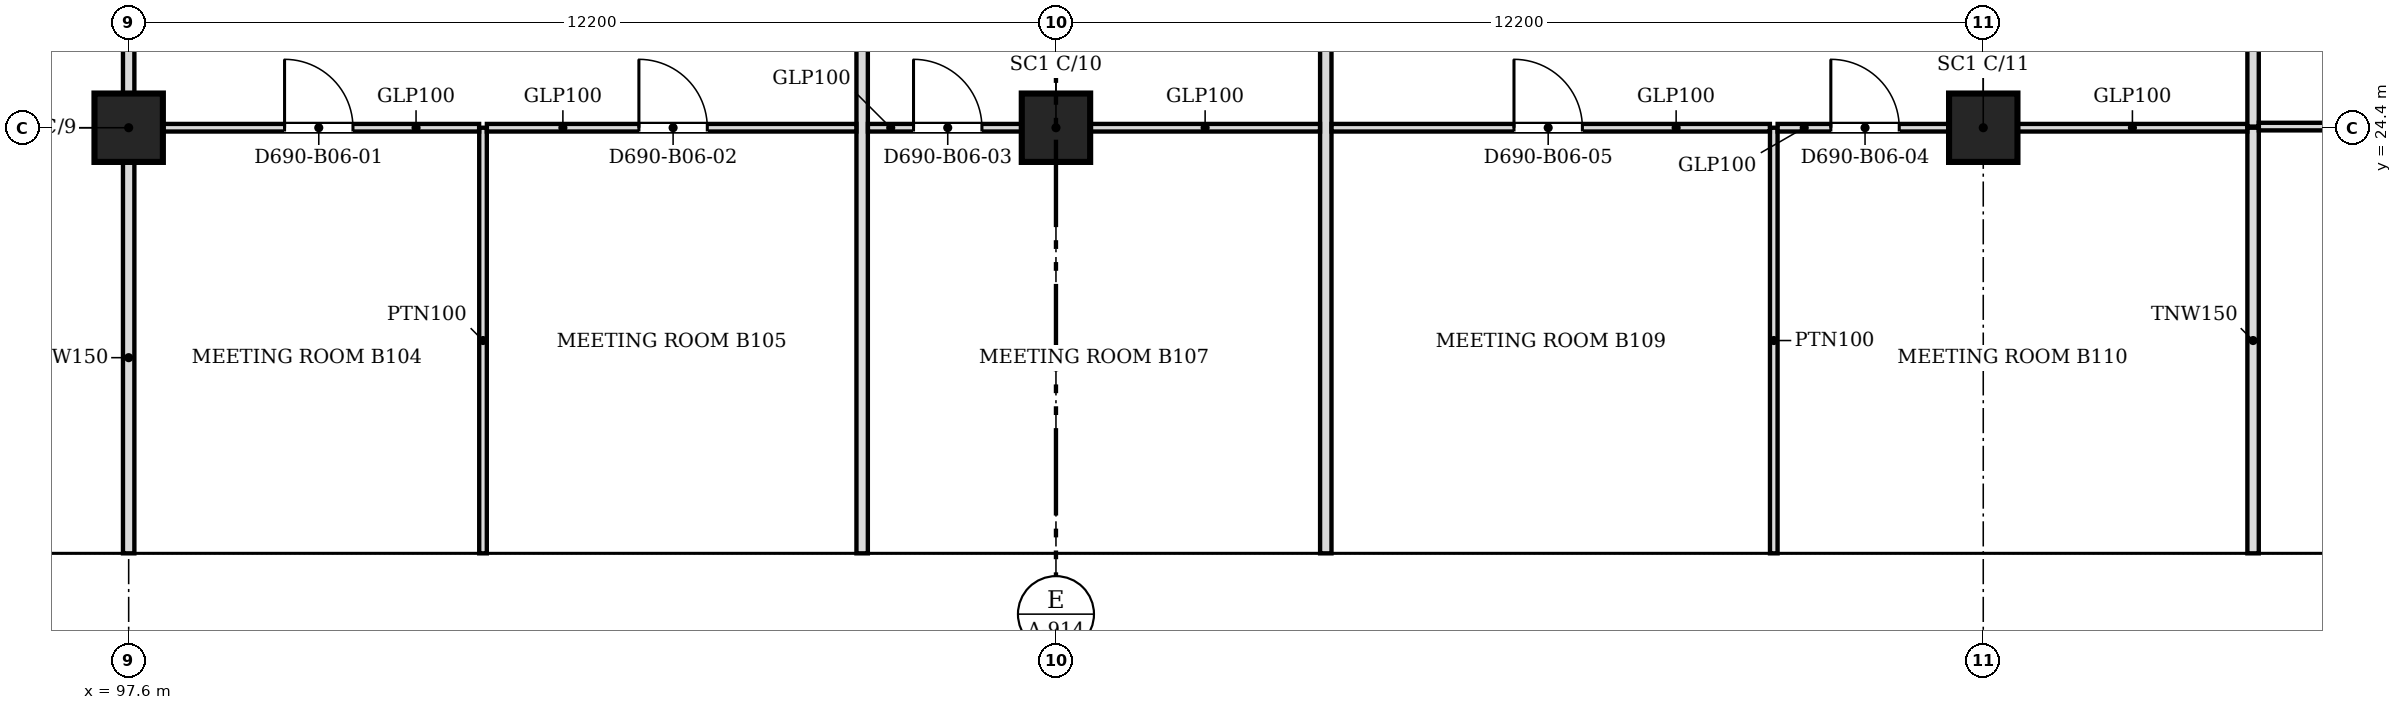
"""IFC4 building model, lengths in metres.
Left out: names, types, materials, properties, quantities, classifications, styles, units other than length and angle.
Written with IfcOpenShell. Run it as: python <this file> out.ifc"""

import sys

from ifc_helpers import new_model, si_unit, direction, frame, frame_2d, origin, origin_2d, place, context, subcontext, project, spatial, polyline, rectangle, outline, extrude, faceted_brep, source, transform, mapped, element, fill, save


model = new_model("IFC4")
c1 = context("Model", 3, precision=1e-05, world=origin(), true_north=direction((0.0, 1.0)))
c2 = subcontext(c1, "Body", "Model", "MODEL_VIEW")
j1 = project(units=[si_unit("LENGTHUNIT", "METRE"), si_unit("PLANEANGLEUNIT", "RADIAN")], contexts=[c1])
p1 = place(None, origin())
s1 = spatial("IfcSite", under=j1, at=p1, CompositionType="ELEMENT")
p2 = place(p1, origin())
s2 = spatial("IfcBuilding", under=s1, at=p2, CompositionType="ELEMENT")
p3 = place(p2, frame((0.0, 0.0, 60.0)))
s3 = spatial("IfcBuildingStorey", under=s2, at=p3, CompositionType="ELEMENT", Elevation=60.0)
for number, where, z_axis, x_axis in (
    (1, (97.6, 24.4, 0.0), (0.0, 0.0, 1.0), (1.0, 0.0, 0.0)),
    (2, (109.8, 24.4, 0.0), (0.0, 0.0, 1.0), (1.0, 0.0, 0.0)),
    (3, (122.0, 24.4, 0.0), (0.0, 0.0, 1.0), (1.0, 0.0, 0.0)),
):
    element("IfcColumn", number, at=place(p3, frame(where, z_axis=z_axis, x_axis=x_axis)), inside=s3, PredefinedType="COLUMN", context=c2, shape_type="SweptSolid", body=[
        extrude(rectangle(XDim=0.9, YDim=0.9, at=origin_2d()), origin(), (0.0, 0.0, 1.0), 3.5),
    ])
m1 = source(origin(), c2, "Body", "Brep", [
    faceted_brep([(3.003, -0.25, 0.0), (6.053, -0.25, 3.8), (3.003, -0.25, 7.6), (0.0, -0.25, 3.8), (0.047, 0.25, 3.859), (3.003, 0.25, 7.6), (6.053, 0.25, 3.8), (3.003, 0.25, 0.0), (0.047, 0.25, 3.741), (0.0, 0.0, 3.8)], [[[0, 1, 2, 3]], [[4, 5, 6, 7, 8]], [[7, 6, 1, 0]], [[6, 5, 2, 1]], [[5, 4, 9, 3, 2]], [[8, 7, 0, 3, 9]], [[8, 9, 4]]]),
])
p4 = place(p3, frame((91.547, 18.55, -3.8), z_axis=(0.0, 0.0, 1.0), x_axis=(1.0, 0.0, 0.0)))
e4 = element("IfcWall", 4, at=p4, inside=s3, PredefinedType="SOLIDWALL", context=c2, shape_type="MappedRepresentation", body=[
    mapped(m1, transform((0.0, 0.0, 0.0), scale=1.0)),
])
m2 = source(origin(), c2, "Body", "SweptSolid", [
    extrude(outline(polyline([(3.005, 0.401), (5.733, 3.8), (3.005, 7.199), (0.319, 3.8), (3.005, 0.401)])), frame((0.0, 0.26, 0.0), z_axis=(0.0, -1.0, 0.0), x_axis=(1.0, 0.0, 0.0)), (0.0, 0.0, 1.0), 0.52),
])
p5 = place(p4, origin())
e5 = element("IfcOpeningElement", 5, at=p5, cuts=e4, PredefinedType="OPENING", context=c2, shape_type="MappedRepresentation", body=[
    mapped(m2, transform((0.0, 0.0, 0.0), scale=1.0)),
])
m3 = source(origin(), c2, "Body", "Brep", [
    faceted_brep([(3.05, -0.25, 0.0), (6.1, -0.25, 3.8), (6.1, -0.25, 3.8), (3.05, -0.25, 7.6), (0.0, -0.25, 3.8), (0.0, 0.25, 3.8), (3.05, 0.25, 7.6), (6.1, 0.25, 3.8), (6.1, 0.25, 3.8), (3.05, 0.25, 0.0)], [[[0, 1, 2, 3, 4]], [[5, 6, 7, 8, 9]], [[9, 8, 1, 0]], [[7, 6, 3, 2]], [[6, 5, 4, 3]], [[5, 9, 0, 4]], [[1, 8, 7, 2]]]),
])
p6 = place(p3, frame((97.6, 18.55, -3.8), z_axis=(0.0, 0.0, 1.0), x_axis=(1.0, 0.0, 0.0)))
e6 = element("IfcWall", 6, at=p6, inside=s3, PredefinedType="SOLIDWALL", context=c2, shape_type="MappedRepresentation", body=[
    mapped(m3, transform((0.0, 0.0, 0.0), scale=1.0)),
])
m4 = source(origin(), c2, "Body", "SweptSolid", [
    extrude(outline(polyline([(3.05, 0.399), (5.78, 3.8), (3.05, 7.201), (0.321, 3.8), (3.05, 0.399)])), frame((0.0, 0.26, 0.0), z_axis=(0.0, -1.0, 0.0), x_axis=(1.0, 0.0, 0.0)), (0.0, 0.0, 1.0), 0.52),
])
p7 = place(p6, origin())
e7 = element("IfcOpeningElement", 7, at=p7, cuts=e6, PredefinedType="OPENING", context=c2, shape_type="MappedRepresentation", body=[
    mapped(m4, transform((0.0, 0.0, 0.0), scale=1.0)),
])
m5 = source(origin(), c2, "Body", "SweptSolid", [
    extrude(outline(polyline([(3.05, 0.0), (6.1, 3.8), (3.05, 7.6), (0.0, 3.8), (3.05, 0.0)])), frame((0.0, 0.25, 0.0), z_axis=(0.0, -1.0, 0.0), x_axis=(1.0, 0.0, 0.0)), (0.0, 0.0, 1.0), 0.5),
])
p8 = place(p3, frame((103.7, 18.55, -3.8), z_axis=(0.0, 0.0, 1.0), x_axis=(1.0, 0.0, 0.0)))
e8 = element("IfcWall", 8, at=p8, inside=s3, PredefinedType="SOLIDWALL", context=c2, shape_type="MappedRepresentation", body=[
    mapped(m5, transform((0.0, 0.0, 0.0), scale=1.0)),
])
p9 = place(p8, origin())
e9 = element("IfcOpeningElement", 9, at=p9, cuts=e8, PredefinedType="OPENING", context=c2, shape_type="MappedRepresentation", body=[
    mapped(m4, transform((0.0, 0.0, 0.0), scale=1.0)),
])
p10 = place(p3, frame((109.8, 18.55, -3.8), z_axis=(0.0, 0.0, 1.0), x_axis=(1.0, 0.0, 0.0)))
e10 = element("IfcWall", 10, at=p10, inside=s3, PredefinedType="SOLIDWALL", context=c2, shape_type="MappedRepresentation", body=[
    mapped(m3, transform((0.0, 0.0, 0.0), scale=1.0)),
])
p11 = place(p10, origin())
e11 = element("IfcOpeningElement", 11, at=p11, cuts=e10, PredefinedType="OPENING", context=c2, shape_type="MappedRepresentation", body=[
    mapped(m4, transform((0.0, 0.0, 0.0), scale=1.0)),
])
p12 = place(p3, frame((115.9, 18.55, -3.8), z_axis=(0.0, 0.0, 1.0), x_axis=(1.0, 0.0, 0.0)))
e12 = element("IfcWall", 12, at=p12, inside=s3, PredefinedType="SOLIDWALL", context=c2, shape_type="MappedRepresentation", body=[
    mapped(m5, transform((0.0, 0.0, 0.0), scale=1.0)),
])
p13 = place(p12, origin())
e13 = element("IfcOpeningElement", 13, at=p13, cuts=e12, PredefinedType="OPENING", context=c2, shape_type="MappedRepresentation", body=[
    mapped(m4, transform((0.0, 0.0, 0.0), scale=1.0)),
])
m6 = source(origin(), c2, "Body", "Brep", [
    faceted_brep([(3.05, -0.25, 0.0), (6.053, -0.25, 3.8), (3.05, -0.25, 7.6), (0.0, -0.25, 3.8), (0.0, 0.25, 3.8), (3.05, 0.25, 7.6), (6.007, 0.25, 3.859), (6.007, 0.25, 3.741), (3.05, 0.25, 0.0), (6.053, 0.0, 3.8)], [[[0, 1, 2, 3]], [[4, 5, 6, 7, 8]], [[8, 7, 9, 1, 0]], [[6, 5, 2, 1, 9]], [[5, 4, 3, 2]], [[4, 8, 0, 3]], [[9, 7, 6]]]),
])
p14 = place(p3, frame((122.0, 18.55, -3.8), z_axis=(0.0, 0.0, 1.0), x_axis=(1.0, 0.0, 0.0)))
e14 = element("IfcWall", 14, at=p14, inside=s3, PredefinedType="SOLIDWALL", context=c2, shape_type="MappedRepresentation", body=[
    mapped(m6, transform((0.0, 0.0, 0.0), scale=1.0)),
])
m7 = source(origin(), c2, "Body", "SweptSolid", [
    extrude(outline(polyline([(3.049, 0.401), (5.735, 3.8), (3.049, 7.199), (0.321, 3.8), (3.049, 0.401)])), frame((0.0, 0.26, 0.0), z_axis=(0.0, -1.0, 0.0), x_axis=(1.0, 0.0, 0.0)), (0.0, 0.0, 1.0), 0.52),
])
p15 = place(p14, origin())
e15 = element("IfcOpeningElement", 15, at=p15, cuts=e14, PredefinedType="OPENING", context=c2, shape_type="MappedRepresentation", body=[
    mapped(m7, transform((0.0, 0.0, 0.0), scale=1.0)),
])
m8 = source(origin(), c2, "Body", "Brep", [
    faceted_brep([(3.05, -0.25, 0.0), (6.1, -0.25, 3.8), (6.1, -0.25, 3.8), (0.0, -0.25, 3.8), (0.0, 0.25, 3.8), (6.1, 0.25, 3.8), (6.1, 0.25, 3.8), (3.05, 0.25, 0.0)], [[[0, 1, 2, 3]], [[4, 5, 6, 7]], [[7, 6, 1, 0]], [[5, 4, 3, 2]], [[4, 7, 0, 3]], [[1, 6, 5, 2]]]),
])
p16 = place(p3, frame((94.55, 18.55, 0.0), z_axis=(0.0, 0.0, 1.0), x_axis=(1.0, 0.0, 0.0)))
e16 = element("IfcWall", 16, at=p16, inside=s3, PredefinedType="SOLIDWALL", context=c2, shape_type="MappedRepresentation", body=[
    mapped(m8, transform((0.0, 0.0, 0.0), scale=1.0)),
])
m9 = source(origin(), c2, "Body", "SweptSolid", [
    extrude(outline(polyline([(3.05, 0.399), (5.579, 3.55), (0.521, 3.55), (3.05, 0.399)])), frame((0.0, 0.26, 0.0), z_axis=(0.0, -1.0, 0.0), x_axis=(1.0, 0.0, 0.0)), (0.0, 0.0, 1.0), 0.52),
])
p17 = place(p16, origin())
e17 = element("IfcOpeningElement", 17, at=p17, cuts=e16, PredefinedType="OPENING", context=c2, shape_type="MappedRepresentation", body=[
    mapped(m9, transform((0.0, 0.0, 0.0), scale=1.0)),
])
m10 = source(origin(), c2, "Body", "SweptSolid", [
    extrude(outline(polyline([(3.05, 0.0), (6.1, 3.8), (0.0, 3.8), (3.05, 0.0)])), frame((0.0, 0.25, 0.0), z_axis=(0.0, -1.0, 0.0), x_axis=(1.0, 0.0, 0.0)), (0.0, 0.0, 1.0), 0.5),
])
p18 = place(p3, frame((100.65, 18.55, 0.0), z_axis=(0.0, 0.0, 1.0), x_axis=(1.0, 0.0, 0.0)))
e18 = element("IfcWall", 18, at=p18, inside=s3, PredefinedType="SOLIDWALL", context=c2, shape_type="MappedRepresentation", body=[
    mapped(m10, transform((0.0, 0.0, 0.0), scale=1.0)),
])
p19 = place(p18, origin())
e19 = element("IfcOpeningElement", 19, at=p19, cuts=e18, PredefinedType="OPENING", context=c2, shape_type="MappedRepresentation", body=[
    mapped(m9, transform((0.0, 0.0, 0.0), scale=1.0)),
])
p20 = place(p3, frame((106.75, 18.55, 0.0), z_axis=(0.0, 0.0, 1.0), x_axis=(1.0, 0.0, 0.0)))
e20 = element("IfcWall", 20, at=p20, inside=s3, PredefinedType="SOLIDWALL", context=c2, shape_type="MappedRepresentation", body=[
    mapped(m10, transform((0.0, 0.0, 0.0), scale=1.0)),
])
p21 = place(p20, origin())
e21 = element("IfcOpeningElement", 21, at=p21, cuts=e20, PredefinedType="OPENING", context=c2, shape_type="MappedRepresentation", body=[
    mapped(m9, transform((0.0, 0.0, 0.0), scale=1.0)),
])
p22 = place(p3, frame((112.85, 18.55, 0.0), z_axis=(0.0, 0.0, 1.0), x_axis=(1.0, 0.0, 0.0)))
e22 = element("IfcWall", 22, at=p22, inside=s3, PredefinedType="SOLIDWALL", context=c2, shape_type="MappedRepresentation", body=[
    mapped(m8, transform((0.0, 0.0, 0.0), scale=1.0)),
])
p23 = place(p22, origin())
e23 = element("IfcOpeningElement", 23, at=p23, cuts=e22, PredefinedType="OPENING", context=c2, shape_type="MappedRepresentation", body=[
    mapped(m9, transform((0.0, 0.0, 0.0), scale=1.0)),
])
p24 = place(p3, frame((118.95, 18.55, 0.0), z_axis=(0.0, 0.0, 1.0), x_axis=(1.0, 0.0, 0.0)))
e24 = element("IfcWall", 24, at=p24, inside=s3, PredefinedType="SOLIDWALL", context=c2, shape_type="MappedRepresentation", body=[
    mapped(m10, transform((0.0, 0.0, 0.0), scale=1.0)),
])
p25 = place(p24, origin())
e25 = element("IfcOpeningElement", 25, at=p25, cuts=e24, PredefinedType="OPENING", context=c2, shape_type="MappedRepresentation", body=[
    mapped(m9, transform((0.0, 0.0, 0.0), scale=1.0)),
])
m11 = source(origin(), c2, "Body", "Brep", [
    faceted_brep([(3.003, -0.25, 0.0), (3.05, -0.25, 0.06), (3.05, -0.25, 3.8), (0.0, -0.25, 3.8), (0.0, 0.25, 3.8), (2.957, 0.25, 3.8), (2.957, 0.25, 0.059), (3.003, 0.0, 0.0)], [[[0, 1, 2, 3]], [[4, 5, 6]], [[1, 0, 7]], [[5, 4, 3, 2]], [[4, 6, 7, 0, 3]], [[1, 7, 6, 5, 2]]]),
])
p26 = place(p3, frame((125.05, 18.55, 0.0), z_axis=(0.0, 0.0, 1.0), x_axis=(1.0, 0.0, 0.0)))
e26 = element("IfcWall", 26, at=p26, inside=s3, PredefinedType="SOLIDWALL", context=c2, shape_type="MappedRepresentation", body=[
    mapped(m11, transform((0.0, 0.0, 0.0), scale=1.0)),
])
m12 = source(origin(), c2, "Body", "SweptSolid", [
    extrude(outline(polyline([(2.803, 3.55), (0.516, 3.55), (2.803, 0.656), (2.803, 3.55)])), frame((0.0, 0.26, 0.0), z_axis=(0.0, -1.0, 0.0), x_axis=(1.0, 0.0, 0.0)), (0.0, 0.0, 1.0), 0.52),
])
p27 = place(p26, origin())
e27 = element("IfcOpeningElement", 27, at=p27, cuts=e26, PredefinedType="OPENING", context=c2, shape_type="MappedRepresentation", body=[
    mapped(m12, transform((0.0, 0.0, 0.0), scale=1.0)),
])
p28 = place(p3, frame((97.6, 18.8, 0.0), z_axis=(0.0, 0.0, 1.0), x_axis=(0.0, 1.0, 0.0)))
e28 = element("IfcWall", 28, at=p28, inside=s3, PredefinedType="PARTITIONING", context=c2, shape_type="SweptSolid", body=[
    extrude(rectangle(XDim=5.149, YDim=0.15, at=frame_2d((2.574, 0.0))), origin(), (0.0, 0.0, 1.0), 2.888),
])
p29 = place(p3, frame((102.262, 18.8, 0.0), z_axis=(0.0, 0.0, 1.0), x_axis=(0.0, 1.0, 0.0)))
e29 = element("IfcWall", 29, at=p29, inside=s3, PredefinedType="PARTITIONING", context=c2, shape_type="SweptSolid", body=[
    extrude(rectangle(XDim=5.6, YDim=0.1, at=frame_2d((2.8, 0.0))), origin(), (0.0, 0.0, 1.0), 2.888),
])
for number, where, z_axis, x_axis in (
    (30, (107.25, 18.8, 0.0), (0.0, 0.0, 1.0), (0.0, 1.0, 0.0)),
    (31, (113.35, 18.8, 0.0), (0.0, 0.0, 1.0), (0.0, 1.0, 0.0)),
):
    element("IfcWall", number, at=place(p3, frame(where, z_axis=z_axis, x_axis=x_axis)), inside=s3, PredefinedType="PARTITIONING", context=c2, shape_type="SweptSolid", body=[
        extrude(rectangle(XDim=15.324, YDim=0.15, at=frame_2d((7.662, 0.0))), origin(), (0.0, 0.0, 1.0), 2.888),
    ])
p30 = place(p3, frame((119.244, 18.8, 0.0), z_axis=(0.0, 0.0, 1.0), x_axis=(0.0, 1.0, 0.0)))
e32 = element("IfcWall", 32, at=p30, inside=s3, PredefinedType="PARTITIONING", context=c2, shape_type="SweptSolid", body=[
    extrude(rectangle(XDim=5.6, YDim=0.1, at=frame_2d((2.8, 0.0))), origin(), (0.0, 0.0, 1.0), 2.888),
])
p31 = place(p3, frame((125.55, 18.8, 0.0), z_axis=(0.0, 0.0, 1.0), x_axis=(0.0, 1.0, 0.0)))
e33 = element("IfcWall", 33, at=p31, inside=s3, PredefinedType="PARTITIONING", context=c2, shape_type="SweptSolid", body=[
    extrude(rectangle(XDim=5.6, YDim=0.15, at=frame_2d((2.8, 0.0))), origin(), (0.0, 0.0, 1.0), 2.888),
])
p32 = place(p3, frame((102.211, 24.4, 0.0), z_axis=(0.0, 0.0, 1.0), x_axis=(-1.0, 0.0, 0.0)))
e34 = element("IfcWall", 34, at=p32, inside=s3, PredefinedType="PARTITIONING", context=c2, shape_type="SweptSolid", body=[
    extrude(rectangle(XDim=4.16, YDim=0.1, at=frame_2d((2.08, 0.0))), origin(), (0.0, 0.0, 1.0), 2.888),
])
m13 = source(origin(), c2, "Body", "SweptSolid", [
    extrude(rectangle(XDim=0.9, YDim=2.1, at=frame_2d((0.45, 1.05))), frame((0.0, 0.06, 0.0), z_axis=(0.0, -1.0, 0.0), x_axis=(1.0, 0.0, 0.0)), (0.0, 0.0, 1.0), 0.12),
])
p33 = place(p32, frame((1.66, 0.0, 0.0)))
e35 = element("IfcOpeningElement", 35, at=p33, cuts=e34, PredefinedType="OPENING", context=c2, shape_type="MappedRepresentation", body=[
    mapped(m13, transform((0.0, 0.0, 0.0), scale=1.0)),
])
p34 = place(p3, frame((107.174, 24.4, 0.0), z_axis=(0.0, 0.0, 1.0), x_axis=(-1.0, 0.0, 0.0)))
e36 = element("IfcWall", 36, at=p34, inside=s3, PredefinedType="PARTITIONING", context=c2, shape_type="SweptSolid", body=[
    extrude(rectangle(XDim=4.861, YDim=0.1, at=frame_2d((2.431, 0.0))), origin(), (0.0, 0.0, 1.0), 2.888),
])
p35 = place(p34, frame((1.961, 0.0, 0.0)))
e37 = element("IfcOpeningElement", 37, at=p35, cuts=e36, PredefinedType="OPENING", context=c2, shape_type="MappedRepresentation", body=[
    mapped(m13, transform((0.0, 0.0, 0.0), scale=1.0)),
])
p36 = place(p3, frame((109.349, 24.4, 0.0), z_axis=(0.0, 0.0, 1.0), x_axis=(-1.0, 0.0, 0.0)))
e38 = element("IfcWall", 38, at=p36, inside=s3, PredefinedType="PARTITIONING", context=c2, shape_type="SweptSolid", body=[
    extrude(rectangle(XDim=2.023, YDim=0.1, at=frame_2d((1.012, 0.0))), origin(), (0.0, 0.0, 1.0), 2.888),
])
p37 = place(p36, frame((0.523, 0.0, 0.0)))
e39 = element("IfcOpeningElement", 39, at=p37, cuts=e38, PredefinedType="OPENING", context=c2, shape_type="MappedRepresentation", body=[
    mapped(m13, transform((0.0, 0.0, 0.0), scale=1.0)),
])
p38 = place(p3, frame((110.251, 24.4, 0.0), z_axis=(0.0, 0.0, 1.0), x_axis=(1.0, 0.0, 0.0)))
e40 = element("IfcWall", 40, at=p38, inside=s3, PredefinedType="PARTITIONING", context=c2, shape_type="SweptSolid", body=[
    extrude(rectangle(XDim=3.023, YDim=0.1, at=frame_2d((1.511, 0.0))), origin(), (0.0, 0.0, 1.0), 2.888),
])
p39 = place(p3, frame((119.193, 24.4, 0.0), z_axis=(0.0, 0.0, 1.0), x_axis=(-1.0, 0.0, 0.0)))
e41 = element("IfcWall", 41, at=p39, inside=s3, PredefinedType="PARTITIONING", context=c2, shape_type="SweptSolid", body=[
    extrude(rectangle(XDim=5.767, YDim=0.1, at=frame_2d((2.883, 0.0))), origin(), (0.0, 0.0, 1.0), 2.888),
])
p40 = place(p39, frame((2.467, 0.0, 0.0)))
e42 = element("IfcOpeningElement", 42, at=p40, cuts=e41, PredefinedType="OPENING", context=c2, shape_type="MappedRepresentation", body=[
    mapped(m13, transform((0.0, 0.0, 0.0), scale=1.0)),
])
p41 = place(p3, frame((121.549, 24.4, 0.0), z_axis=(0.0, 0.0, 1.0), x_axis=(-1.0, 0.0, 0.0)))
e43 = element("IfcWall", 43, at=p41, inside=s3, PredefinedType="PARTITIONING", context=c2, shape_type="SweptSolid", body=[
    extrude(rectangle(XDim=2.254, YDim=0.1, at=frame_2d((1.127, 0.0))), origin(), (0.0, 0.0, 1.0), 2.888),
])
p42 = place(p41, frame((0.654, 0.0, 0.0)))
e44 = element("IfcOpeningElement", 44, at=p42, cuts=e43, PredefinedType="OPENING", context=c2, shape_type="MappedRepresentation", body=[
    mapped(m13, transform((0.0, 0.0, 0.0), scale=1.0)),
])
p43 = place(p3, frame((122.451, 24.4, 0.0), z_axis=(0.0, 0.0, 1.0), x_axis=(1.0, 0.0, 0.0)))
e45 = element("IfcWall", 45, at=p43, inside=s3, PredefinedType="PARTITIONING", context=c2, shape_type="SweptSolid", body=[
    extrude(rectangle(XDim=3.023, YDim=0.1, at=frame_2d((1.512, 0.0))), origin(), (0.0, 0.0, 1.0), 2.888),
])
p44 = place(p3, frame((125.55, 24.415, 0.0), z_axis=(0.0, 0.0, 1.0), x_axis=(0.0, 1.0, 0.0)))
e46 = element("IfcWall", 46, at=p44, inside=s3, PredefinedType="PARTITIONING", context=c2, shape_type="SweptSolid", body=[
    extrude(rectangle(XDim=9.709, YDim=0.15, at=frame_2d((4.854, 0.0))), origin(), (0.0, 0.0, 1.0), 2.888),
])
p45 = place(p3, frame((133.67, 24.415, 0.0), z_axis=(0.0, 0.0, 1.0), x_axis=(-1.0, 0.0, 0.0)))
e47 = element("IfcWall", 47, at=p45, inside=s3, PredefinedType="PARTITIONING", context=c2, shape_type="SweptSolid", body=[
    extrude(rectangle(XDim=8.044, YDim=0.1, at=frame_2d((4.022, 0.0))), origin(), (0.0, 0.0, 1.0), 2.888),
])
p46 = place(p45, frame((3.544, 0.0, 0.0)))
e48 = element("IfcOpeningElement", 48, at=p46, cuts=e47, PredefinedType="OPENING", context=c2, shape_type="MappedRepresentation", body=[
    mapped(m13, transform((0.0, 0.0, 0.0), scale=1.0)),
])
p47 = place(p3, frame((97.6, 24.851, 0.0), z_axis=(0.0, 0.0, 1.0), x_axis=(0.0, 1.0, 0.0)))
e49 = element("IfcWall", 49, at=p47, inside=s3, PredefinedType="PARTITIONING", context=c2, shape_type="SweptSolid", body=[
    extrude(rectangle(XDim=9.273, YDim=0.15, at=frame_2d((4.636, 0.0))), origin(), (0.0, 0.0, 1.0), 2.888),
])
m14 = source(origin(), c2, "Body", "SweptSolid", [
    extrude(rectangle(XDim=0.9, YDim=2.1, at=frame_2d((0.45, 1.05))), frame((0.0, 0.025, 0.0), z_axis=(0.0, -1.0, 0.0), x_axis=(1.0, 0.0, 0.0)), (0.0, 0.0, 1.0), 0.05),
])
p48 = place(p33, origin())
e50 = element("IfcDoor", 50, at=p48, inside=s3, OperationType="SINGLE_SWING_RIGHT", PredefinedType="DOOR", context=c2, shape_type="MappedRepresentation", body=[
    mapped(m14, transform((0.0, 0.0, 0.0), scale=1.0)),
])
fill(e35, e50)
p49 = place(p35, origin())
e51 = element("IfcDoor", 51, at=p49, inside=s3, OperationType="SINGLE_SWING_RIGHT", PredefinedType="DOOR", context=c2, shape_type="MappedRepresentation", body=[
    mapped(m14, transform((0.0, 0.0, 0.0), scale=1.0)),
])
fill(e37, e51)
p50 = place(p37, origin())
e52 = element("IfcDoor", 52, at=p50, inside=s3, OperationType="SINGLE_SWING_RIGHT", PredefinedType="DOOR", context=c2, shape_type="MappedRepresentation", body=[
    mapped(m14, transform((0.0, 0.0, 0.0), scale=1.0)),
])
fill(e39, e52)
p51 = place(p42, origin())
e53 = element("IfcDoor", 53, at=p51, inside=s3, OperationType="SINGLE_SWING_RIGHT", PredefinedType="DOOR", context=c2, shape_type="MappedRepresentation", body=[
    mapped(m14, transform((0.0, 0.0, 0.0), scale=1.0)),
])
fill(e44, e53)
p52 = place(p40, origin())
e54 = element("IfcDoor", 54, at=p52, inside=s3, OperationType="SINGLE_SWING_RIGHT", PredefinedType="DOOR", context=c2, shape_type="MappedRepresentation", body=[
    mapped(m14, transform((0.0, 0.0, 0.0), scale=1.0)),
])
fill(e42, e54)
save(model, sys.argv[1])
